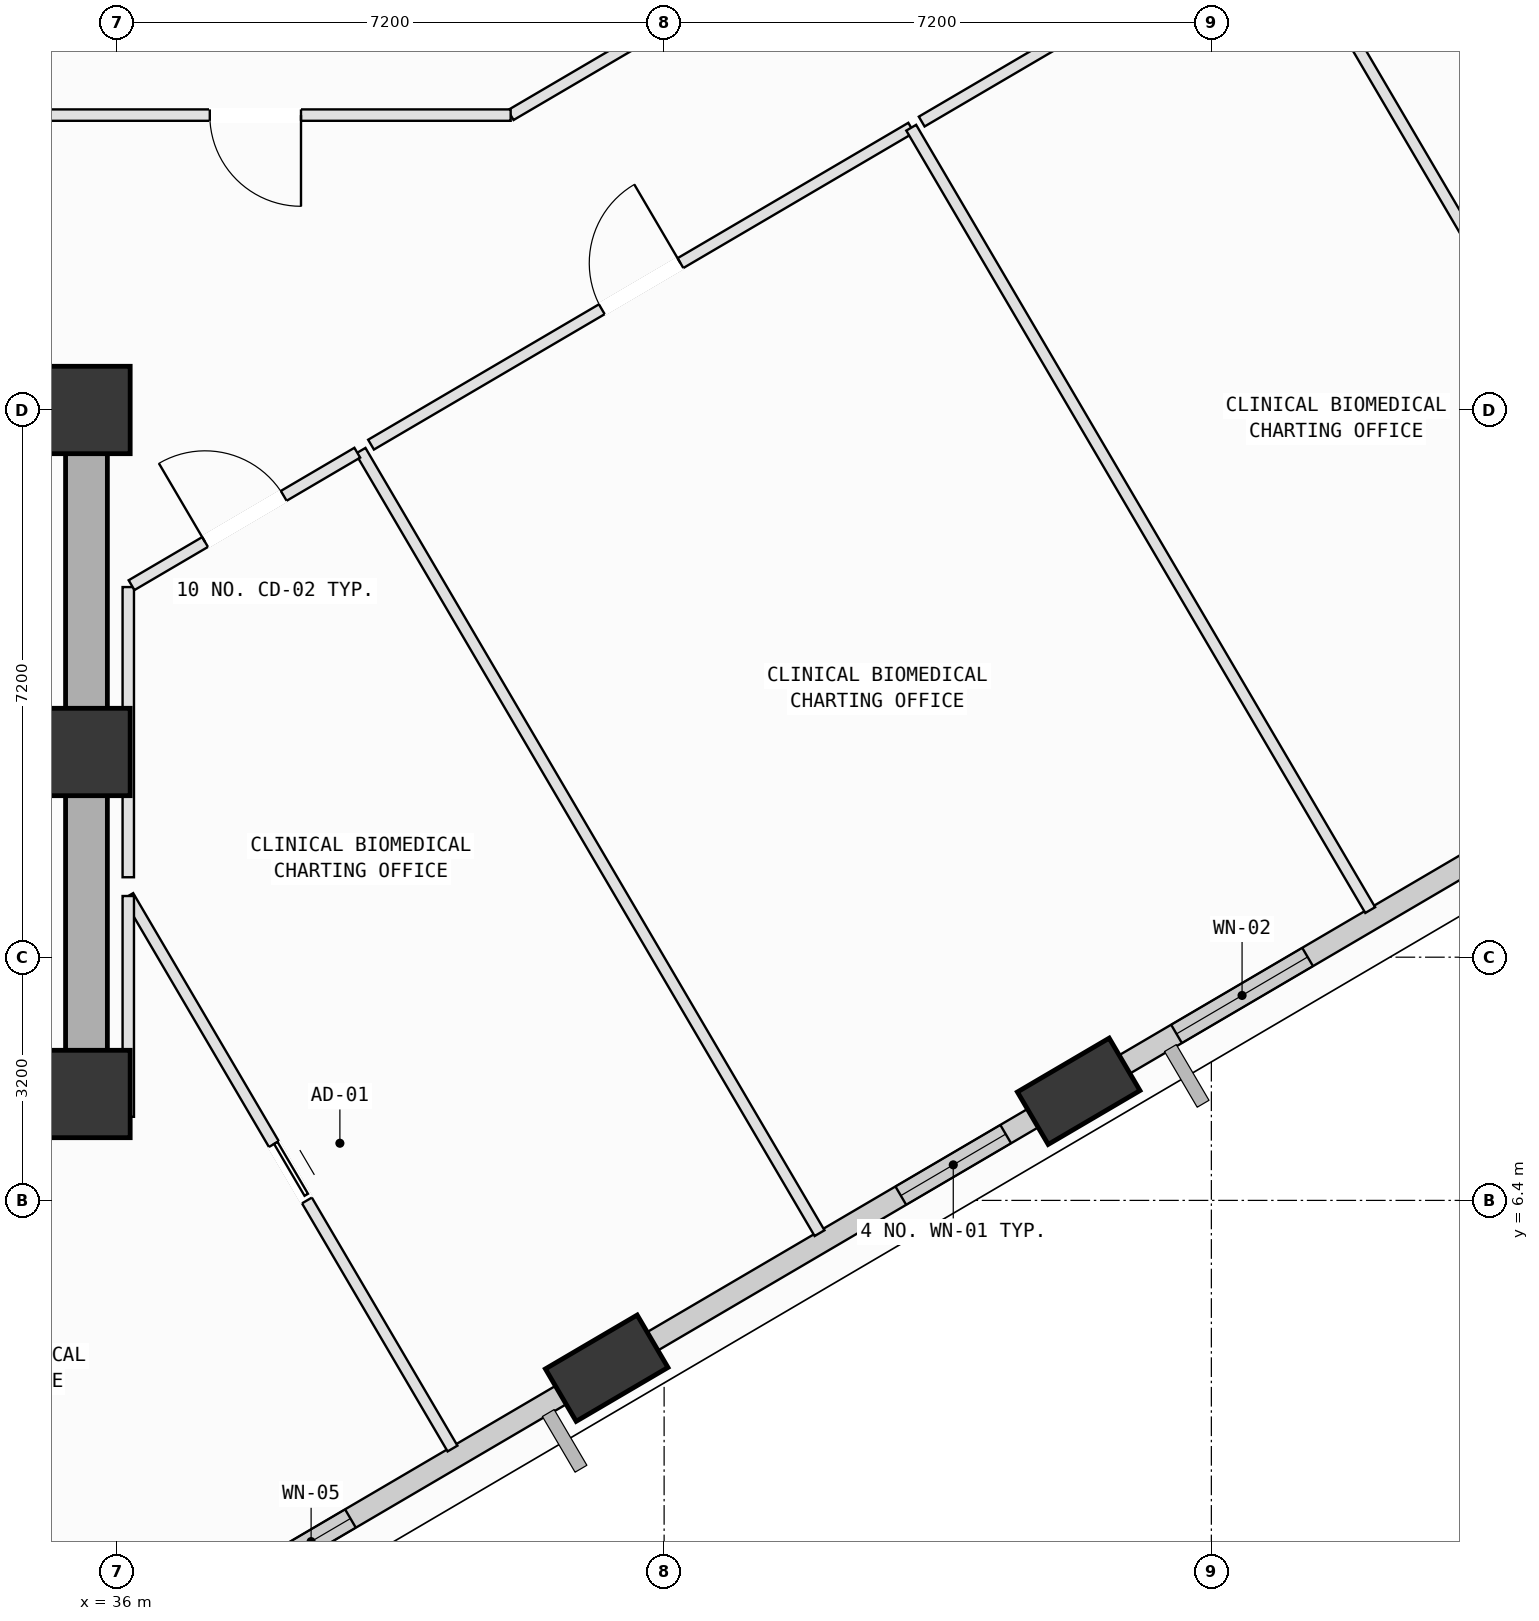
"""IFC4 building model, lengths in metres.
Left out: names, types, materials, properties, quantities, classifications, styles, units other than length and angle.
Written with IfcOpenShell. Run it as: python <this file> out.ifc"""

import sys

from ifc_helpers import new_model, si_unit, direction, frame, frame_2d, origin, origin_2d, place, context, subcontext, project, spatial, rectangle, extrude, element, fill, save


model = new_model("IFC4")
c1 = context("Model", 3, precision=1e-05, world=origin(), true_north=direction((0.0, 1.0)))
c2 = subcontext(c1, "Body", "Model", "MODEL_VIEW")
j1 = project(units=[si_unit("LENGTHUNIT", "METRE"), si_unit("PLANEANGLEUNIT", "RADIAN")], contexts=[c1])
p1 = place(None, origin())
s1 = spatial("IfcSite", under=j1, at=p1, CompositionType="ELEMENT")
p2 = place(p1, origin())
s2 = spatial("IfcBuilding", under=s1, at=p2, CompositionType="ELEMENT")
p3 = place(p2, frame((0.0, 0.0, 153.8)))
s3 = spatial("IfcBuildingStorey", under=s2, at=p3, CompositionType="ELEMENT", Elevation=153.8)
for number, where, z_axis, x_axis in (
    (1, (35.6, 7.8, 0.0), (0.0, 0.0, 1.0), (1.0, 0.0, 0.0)),
    (2, (35.6, 12.3, 0.0), (0.0, 0.0, 1.0), (1.0, 0.0, 0.0)),
    (3, (35.6, 16.8, 0.0), (0.0, 0.0, 1.0), (1.0, 0.0, 0.0)),
):
    element("IfcColumn", number, at=place(p3, frame(where, z_axis=z_axis, x_axis=x_axis)), inside=s3, PredefinedType="COLUMN", context=c2, shape_type="SweptSolid", body=[
        extrude(rectangle(XDim=1.15, YDim=1.15, at=origin_2d()), origin(), (0.0, 0.0, 1.0), 4.0),
    ])
p4 = place(p3, frame((42.444, 4.192, 0.002), z_axis=(0.084734624641, 0.037227272276, 0.995707875627), x_axis=(-0.808235091412, 0.586994535222, 0.04683431039)))
e4 = element("IfcColumn", 4, at=p4, inside=s3, PredefinedType="COLUMN", context=c2, shape_type="SweptSolid", body=[
    extrude(rectangle(XDim=1.4, YDim=0.8, at=origin_2d()), origin(), (0.0, 0.0, 1.0), 4.014),
])
p5 = place(p3, frame((48.655, 7.836, 0.002), z_axis=(0.069459877743, 0.062708523602, 0.995611855319), x_axis=(-0.951941580649, 0.302596781144, 0.047354145259)))
e5 = element("IfcColumn", 5, at=p5, inside=s3, PredefinedType="COLUMN", context=c2, shape_type="SweptSolid", body=[
    extrude(rectangle(XDim=1.4, YDim=0.8, at=origin_2d()), origin(), (0.0, 0.0, 1.0), 4.014),
])
p6 = place(p3, frame((42.176, 4.035, 0.0), z_axis=(0.0, 0.0, 1.0), x_axis=(-0.862519418653, -0.5060239643, 0.0)))
e6 = element("IfcWall", 6, at=p6, inside=s3, PredefinedType="SOLIDWALL", context=c2, shape_type="SweptSolid", body=[
    extrude(rectangle(XDim=6.214, YDim=0.28, at=frame_2d((3.107, 0.0))), origin(), (0.0, 0.0, 1.0), 3.165),
])
p7 = place(p6, frame((3.597, 0.0, 0.75)))
e7 = element("IfcOpeningElement", 7, at=p7, cuts=e6, PredefinedType="OPENING", context=c2, shape_type="SweptSolid", body=[
    extrude(rectangle(XDim=1.2, YDim=1.75, at=frame_2d((0.6, 0.875))), frame((0.0, 0.15, 0.0), z_axis=(0.0, -1.0, 0.0), x_axis=(1.0, 0.0, 0.0)), (0.0, 0.0, 1.0), 0.3),
])
p8 = place(p3, frame((48.386, 7.678, 0.0), z_axis=(0.0, 0.0, 1.0), x_axis=(-0.862526965114, -0.506011101115, 0.0)))
e8 = element("IfcWall", 8, at=p8, inside=s3, PredefinedType="SOLIDWALL", context=c2, shape_type="SweptSolid", body=[
    extrude(rectangle(XDim=6.209, YDim=0.28, at=frame_2d((3.104, 0.0))), origin(), (0.0, 0.0, 1.0), 3.165),
])
p9 = place(p8, frame((0.802, 0.0, 0.75)))
e9 = element("IfcOpeningElement", 9, at=p9, cuts=e8, PredefinedType="OPENING", context=c2, shape_type="SweptSolid", body=[
    extrude(rectangle(XDim=1.6, YDim=1.95, at=frame_2d((0.8, 0.975))), frame((0.0, 0.15, 0.0), z_axis=(0.0, -1.0, 0.0), x_axis=(1.0, 0.0, 0.0)), (0.0, 0.0, 1.0), 0.3),
])
p10 = place(p3, frame((54.603, 11.326, 0.0), z_axis=(0.0, 0.0, 1.0), x_axis=(-0.862523077898, -0.506017727055, 0.0)))
e10 = element("IfcWall", 10, at=p10, inside=s3, PredefinedType="SOLIDWALL", context=c2, shape_type="SweptSolid", body=[
    extrude(rectangle(XDim=6.218, YDim=0.28, at=frame_2d((3.109, 0.0))), origin(), (0.0, 0.0, 1.0), 3.165),
])
p11 = place(p10, frame((3.405, 0.0, 0.75)))
e11 = element("IfcOpeningElement", 11, at=p11, cuts=e10, PredefinedType="OPENING", context=c2, shape_type="SweptSolid", body=[
    extrude(rectangle(XDim=2.0, YDim=1.95, at=frame_2d((1.0, 0.975))), frame((0.0, 0.15, 0.0), z_axis=(0.0, -1.0, 0.0), x_axis=(1.0, 0.0, 0.0)), (0.0, 0.0, 1.0), 0.3),
])
p12 = place(p3, frame((24.8, 7.8, 0.0), z_axis=(0.0, 0.0, 1.0), x_axis=(1.0, 0.0, 0.0)))
e12 = element("IfcWall", 12, at=p12, inside=s3, PredefinedType="SHEAR", context=c2, shape_type="SweptSolid", body=[
    extrude(rectangle(XDim=10.8, YDim=0.55, at=frame_2d((5.4, 0.0))), origin(), (0.0, 0.0, 1.0), 3.78),
])
p13 = place(p3, frame((35.6, 7.8, 0.0), z_axis=(0.0, 0.0, 1.0), x_axis=(0.0, 1.0, 0.0)))
e13 = element("IfcWall", 13, at=p13, inside=s3, PredefinedType="SHEAR", context=c2, shape_type="SweptSolid", body=[
    extrude(rectangle(XDim=9.0, YDim=0.55, at=frame_2d((4.5, 0.0))), origin(), (0.0, 0.0, 1.0), 3.78),
])
p14 = place(p3, frame((36.15, 10.405, 0.0), z_axis=(0.0, 0.0, 1.0), x_axis=(0.506105969003, -0.862471302792, 0.0)))
e14 = element("IfcWall", 14, at=p14, inside=s3, PredefinedType="PARTITIONING", context=c2, shape_type="SweptSolid", body=[
    extrude(rectangle(XDim=8.429, YDim=0.15, at=frame_2d((4.215, 0.0))), origin(), (0.0, 0.0, 1.0), 3.78),
])
p15 = place(p14, frame((3.785, 0.0, 0.0)))
e15 = element("IfcOpeningElement", 15, at=p15, cuts=e14, PredefinedType="OPENING", context=c2, shape_type="SweptSolid", body=[
    extrude(rectangle(XDim=0.86, YDim=2.06, at=frame_2d((0.43, 1.03))), frame((0.0, 0.085, 0.0), z_axis=(0.0, -1.0, 0.0), x_axis=(1.0, 0.0, 0.0)), (0.0, 0.0, 1.0), 0.17),
])
p16 = place(p3, frame((35.6, 7.5, 0.0), z_axis=(0.0, 0.0, 1.0), x_axis=(1.0, 0.0, 0.0)))
e16 = element("IfcWall", 16, at=p16, inside=s3, PredefinedType="PARTITIONING", context=c2, shape_type="SweptSolid", body=[
    extrude(rectangle(XDim=0.55, YDim=0.15, at=frame_2d((0.275, 0.0))), origin(), (0.0, 0.0, 1.0), 3.065),
])
p17 = place(p3, frame((36.15, 7.5, 0.0), z_axis=(0.0, 0.0, 1.0), x_axis=(0.0, 1.0, 0.0)))
e17 = element("IfcWall", 17, at=p17, inside=s3, PredefinedType="PARTITIONING", context=c2, shape_type="SweptSolid", body=[
    extrude(rectangle(XDim=2.905, YDim=0.15, at=frame_2d((1.453, 0.0))), origin(), (0.0, 0.0, 1.0), 3.78),
])
p18 = place(p3, frame((39.206, 16.263, 0.0), z_axis=(0.0, 0.0, 1.0), x_axis=(0.506011364749, -0.86252681045, 0.0)))
e18 = element("IfcWall", 18, at=p18, inside=s3, PredefinedType="PARTITIONING", context=c2, shape_type="SweptSolid", body=[
    extrude(rectangle(XDim=11.935, YDim=0.15, at=frame_2d((5.967, 0.0))), origin(), (0.0, 0.0, 1.0), 3.78),
])
p19 = place(p3, frame((43.148, 4.338, 0.0), z_axis=(0.0, 0.0, 1.0), x_axis=(-0.862616526178, -0.505858407822, 0.0)))
e19 = element("IfcWall", 19, at=p19, inside=s3, PredefinedType="PARTITIONING", context=c2, shape_type="SweptSolid", body=[
    extrude(rectangle(XDim=0.992, YDim=0.15, at=frame_2d((0.496, 0.0))), origin(), (0.0, 0.0, 1.0), 3.165),
])
p20 = place(p3, frame((36.15, 10.652, 0.0), z_axis=(0.0, 0.0, 1.0), x_axis=(0.0, 1.0, 0.0)))
e20 = element("IfcWall", 20, at=p20, inside=s3, PredefinedType="PARTITIONING", context=c2, shape_type="SweptSolid", body=[
    extrude(rectangle(XDim=3.818, YDim=0.15, at=frame_2d((1.909, 0.0))), origin(), (0.0, 0.0, 1.0), 3.78),
])
p21 = place(p3, frame((36.193, 14.495, 0.0), z_axis=(0.0, 0.0, 1.0), x_axis=(0.862456823748, 0.506130642395, 0.0)))
e21 = element("IfcWall", 21, at=p21, inside=s3, PredefinedType="PARTITIONING", context=c2, shape_type="SweptSolid", body=[
    extrude(rectangle(XDim=3.444, YDim=0.15, at=frame_2d((1.722, 0.0))), origin(), (0.0, 0.0, 1.0), 3.78),
])
p22 = place(p21, frame((1.122, 0.0, 0.0)))
e22 = element("IfcOpeningElement", 22, at=p22, cuts=e21, PredefinedType="OPENING", context=c2, shape_type="SweptSolid", body=[
    extrude(rectangle(XDim=1.2, YDim=2.15, at=frame_2d((0.6, 1.075))), frame((0.0, 0.085, 0.0), z_axis=(0.0, -1.0, 0.0), x_axis=(1.0, 0.0, 0.0)), (0.0, 0.0, 1.0), 0.17),
])
p23 = place(p3, frame((39.344, 16.344, 0.0), z_axis=(0.0, 0.0, 1.0), x_axis=(0.862497317199, 0.506061634413, 0.0)))
e23 = element("IfcWall", 23, at=p23, inside=s3, PredefinedType="PARTITIONING", context=c2, shape_type="SweptSolid", body=[
    extrude(rectangle(XDim=8.24, YDim=0.15, at=frame_2d((4.12, 0.0))), origin(), (0.0, 0.0, 1.0), 3.78),
])
p24 = place(p23, frame((3.52, 0.0, 0.0)))
e24 = element("IfcOpeningElement", 24, at=p24, cuts=e23, PredefinedType="OPENING", context=c2, shape_type="SweptSolid", body=[
    extrude(rectangle(XDim=1.2, YDim=2.15, at=frame_2d((0.6, 1.075))), frame((0.0, 0.085, 0.0), z_axis=(0.0, -1.0, 0.0), x_axis=(1.0, 0.0, 0.0)), (0.0, 0.0, 1.0), 0.17),
])
p25 = place(p3, frame((46.451, 20.514, 0.0), z_axis=(0.0, 0.0, 1.0), x_axis=(0.506011364749, -0.86252681045, 0.0)))
e25 = element("IfcWall", 25, at=p25, inside=s3, PredefinedType="PARTITIONING", context=c2, shape_type="SweptSolid", body=[
    extrude(rectangle(XDim=11.935, YDim=0.15, at=frame_2d((5.967, 0.0))), origin(), (0.0, 0.0, 1.0), 3.415),
])
p26 = place(p3, frame((49.356, 7.981, 0.0), z_axis=(0.0, 0.0, 1.0), x_axis=(-0.862289281712, -0.506416029214, 0.0)))
e26 = element("IfcWall", 26, at=p26, inside=s3, PredefinedType="PARTITIONING", context=c2, shape_type="SweptSolid", body=[
    extrude(rectangle(XDim=0.989, YDim=0.15, at=frame_2d((0.495, 0.0))), origin(), (0.0, 0.0, 1.0), 3.165),
])
p27 = place(p3, frame((46.589, 20.595, 0.0), z_axis=(0.0, 0.0, 1.0), x_axis=(0.862575050657, 0.505929127433, 0.0)))
e27 = element("IfcWall", 27, at=p27, inside=s3, PredefinedType="PARTITIONING", context=c2, shape_type="SweptSolid", body=[
    extrude(rectangle(XDim=5.439, YDim=0.15, at=frame_2d((2.72, 0.0))), origin(), (0.0, 0.0, 1.0), 3.065),
])
p28 = place(p27, frame((2.12, 0.0, 0.0)))
e28 = element("IfcOpeningElement", 28, at=p28, cuts=e27, PredefinedType="OPENING", context=c2, shape_type="SweptSolid", body=[
    extrude(rectangle(XDim=1.2, YDim=2.15, at=frame_2d((0.6, 1.075))), frame((0.0, 0.085, 0.0), z_axis=(0.0, -1.0, 0.0), x_axis=(1.0, 0.0, 0.0)), (0.0, 0.0, 1.0), 0.17),
])
p29 = place(p3, frame((51.281, 23.347, 0.0), z_axis=(0.0, 0.0, 1.0), x_axis=(0.506072235551, -0.862491097, 0.0)))
e29 = element("IfcWall", 29, at=p29, inside=s3, PredefinedType="PARTITIONING", context=c2, shape_type="SweptSolid", body=[
    extrude(rectangle(XDim=11.935, YDim=0.15, at=frame_2d((5.968, 0.0))), origin(), (0.0, 0.0, 1.0), 3.78),
])
p30 = place(p3, frame((45.978, 23.494, 0.0), z_axis=(0.0, 0.0, 1.0), x_axis=(-0.862551983002, -0.505968454175, 0.0)))
e30 = element("IfcWall", 30, at=p30, inside=s3, PredefinedType="PARTITIONING", context=c2, shape_type="SweptSolid", body=[
    extrude(rectangle(XDim=5.562, YDim=0.15, at=frame_2d((2.781, 0.0))), origin(), (0.0, 0.0, 1.0), 3.78),
])
p31 = place(p3, frame((41.181, 20.68, 0.0), z_axis=(0.0, 0.0, 1.0), x_axis=(-1.0, 0.0, 0.0)))
e31 = element("IfcWall", 31, at=p31, inside=s3, PredefinedType="PARTITIONING", context=c2, shape_type="SweptSolid", body=[
    extrude(rectangle(XDim=6.717, YDim=0.15, at=frame_2d((3.358, 0.0))), origin(), (0.0, 0.0, 1.0), 3.415),
])
p32 = place(p31, frame((2.759, 0.0, 0.0)))
e32 = element("IfcOpeningElement", 32, at=p32, cuts=e31, PredefinedType="OPENING", context=c2, shape_type="SweptSolid", body=[
    extrude(rectangle(XDim=1.2, YDim=2.15, at=frame_2d((0.6, 1.075))), frame((0.0, 0.085, 0.0), z_axis=(0.0, -1.0, 0.0), x_axis=(1.0, 0.0, 0.0)), (0.0, 0.0, 1.0), 0.17),
])
p33 = place(p7, origin())
e33 = element("IfcWindow", 33, at=p33, inside=s3, PartitioningType="SINGLE_PANEL", PredefinedType="WINDOW", context=c2, shape_type="SweptSolid", body=[
    extrude(rectangle(XDim=1.2, YDim=1.75, at=frame_2d((0.6, 0.875))), frame((0.0, 0.03, 0.0), z_axis=(0.0, -1.0, 0.0), x_axis=(1.0, 0.0, 0.0)), (0.0, 0.0, 1.0), 0.06),
])
fill(e7, e33)
p34 = place(p9, origin())
e34 = element("IfcWindow", 34, at=p34, inside=s3, PartitioningType="SINGLE_PANEL", PredefinedType="WINDOW", context=c2, shape_type="SweptSolid", body=[
    extrude(rectangle(XDim=1.6, YDim=1.95, at=frame_2d((0.8, 0.975))), frame((0.0, 0.03, 0.0), z_axis=(0.0, -1.0, 0.0), x_axis=(1.0, 0.0, 0.0)), (0.0, 0.0, 1.0), 0.06),
])
fill(e9, e34)
p35 = place(p11, origin())
e35 = element("IfcWindow", 35, at=p35, inside=s3, PartitioningType="SINGLE_PANEL", PredefinedType="WINDOW", context=c2, shape_type="SweptSolid", body=[
    extrude(rectangle(XDim=2.0, YDim=1.95, at=frame_2d((1.0, 0.975))), frame((0.0, 0.03, 0.0), z_axis=(0.0, -1.0, 0.0), x_axis=(1.0, 0.0, 0.0)), (0.0, 0.0, 1.0), 0.06),
])
fill(e11, e35)
p36 = place(p22, origin())
e36 = element("IfcDoor", 36, at=p36, inside=s3, OperationType="SINGLE_SWING_LEFT", PredefinedType="DOOR", context=c2, shape_type="SweptSolid", body=[
    extrude(rectangle(XDim=1.2, YDim=2.15, at=frame_2d((0.6, 1.075))), frame((0.0, 0.025, 0.0), z_axis=(0.0, -1.0, 0.0), x_axis=(1.0, 0.0, 0.0)), (0.0, 0.0, 1.0), 0.05),
])
fill(e22, e36)
p37 = place(p24, origin())
e37 = element("IfcDoor", 37, at=p37, inside=s3, OperationType="SINGLE_SWING_RIGHT", PredefinedType="DOOR", context=c2, shape_type="SweptSolid", body=[
    extrude(rectangle(XDim=1.2, YDim=2.15, at=frame_2d((0.6, 1.075))), frame((0.0, 0.025, 0.0), z_axis=(0.0, -1.0, 0.0), x_axis=(1.0, 0.0, 0.0)), (0.0, 0.0, 1.0), 0.05),
])
fill(e24, e37)
p38 = place(p32, origin())
e38 = element("IfcDoor", 38, at=p38, inside=s3, OperationType="SINGLE_SWING_LEFT", PredefinedType="DOOR", context=c2, shape_type="SweptSolid", body=[
    extrude(rectangle(XDim=1.2, YDim=2.15, at=frame_2d((0.6, 1.075))), frame((0.0, 0.025, 0.0), z_axis=(0.0, -1.0, 0.0), x_axis=(1.0, 0.0, 0.0)), (0.0, 0.0, 1.0), 0.05),
])
fill(e32, e38)
p39 = place(p15, origin())
e39 = element("IfcDoor", 39, at=p39, inside=s3, OperationType="SLIDING_TO_LEFT", PredefinedType="DOOR", context=c2, shape_type="SweptSolid", body=[
    extrude(rectangle(XDim=0.86, YDim=2.06, at=frame_2d((0.43, 1.03))), frame((0.0, 0.025, 0.0), z_axis=(0.0, -1.0, 0.0), x_axis=(1.0, 0.0, 0.0)), (0.0, 0.0, 1.0), 0.05),
])
fill(e15, e39)
save(model, sys.argv[1])
